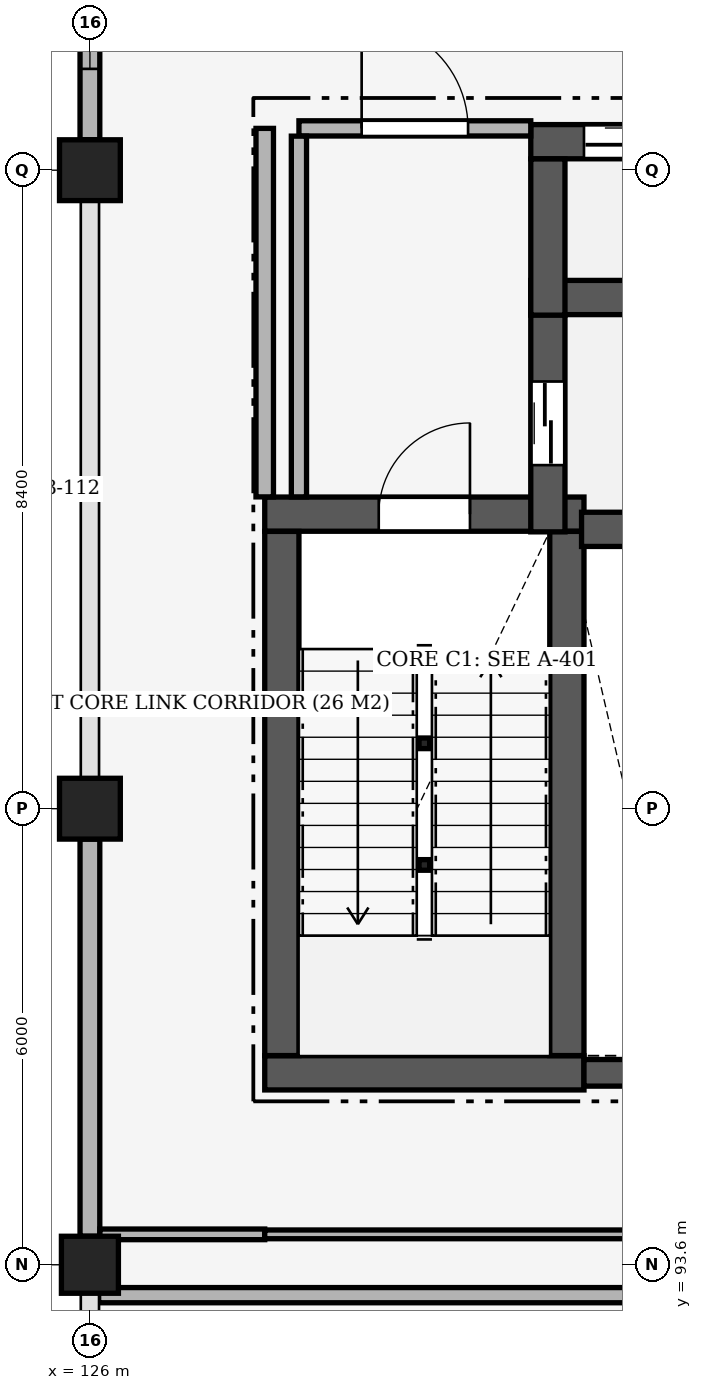
"""IFC4 building model, lengths in metres.
Left out: names, types, materials, properties, quantities, classifications, styles, units other than length and angle.
Written with IfcOpenShell. Run it as: python <this file> out.ifc"""

import sys

from ifc_helpers import new_model, si_unit, direction, frame, frame_2d, origin, origin_2d, place, context, subcontext, project, spatial, rectangle, hollow_circle, extrude, element, fill, save


model = new_model("IFC4")
c1 = context("Model", 3, precision=1e-05, world=origin(), true_north=direction((0.0, 1.0)))
c2 = subcontext(c1, "Body", "Model", "MODEL_VIEW")
j1 = project(units=[si_unit("LENGTHUNIT", "METRE"), si_unit("PLANEANGLEUNIT", "RADIAN")], contexts=[c1])
p1 = place(None, origin())
s1 = spatial("IfcSite", under=j1, at=p1, CompositionType="ELEMENT")
p2 = place(p1, origin())
s2 = spatial("IfcBuilding", under=s1, at=p2, CompositionType="ELEMENT")
p3 = place(p2, frame((0.0, 0.0, 15.3)))
s3 = spatial("IfcBuildingStorey", under=s2, at=p3, CompositionType="ELEMENT", Elevation=15.3)
p4 = place(p3, frame((126.0, 93.6, 0.0), z_axis=(0.0, 0.0, 1.0), x_axis=(1.0, 0.0, 0.0)))
e1 = element("IfcColumn", 1, at=p4, inside=s3, PredefinedType="COLUMN", context=c2, shape_type="SweptSolid", body=[
    extrude(rectangle(XDim=0.75, YDim=0.75, at=origin_2d()), origin(), (0.0, 0.0, 1.0), 5.1),
])
for number, where, z_axis, x_axis in (
    (2, (126.0, 99.6, 0.0), (0.0, 0.0, 1.0), (1.0, 0.0, 0.0)),
    (3, (126.0, 108.0, 0.0), (0.0, 0.0, 1.0), (1.0, 0.0, 0.0)),
):
    element("IfcColumn", number, at=place(p3, frame(where, z_axis=z_axis, x_axis=x_axis)), inside=s3, PredefinedType="COLUMN", context=c2, shape_type="SweptSolid", body=[
        extrude(rectangle(XDim=0.8, YDim=0.8, at=origin_2d()), origin(), (0.0, 0.0, 1.0), 5.1),
    ])
for number, where, z_axis, x_axis in (
    (4, (130.4, 98.86, -2.98), (0.0, 0.0, 1.0), (1.0, 0.0, 0.0)),
    (5, (130.4, 100.46, -2.98), (0.0, 0.0, 1.0), (1.0, 0.0, 0.0)),
):
    element("IfcColumn", number, at=place(p3, frame(where, z_axis=z_axis, x_axis=x_axis)), inside=s3, PredefinedType="COLUMN", context=c2, shape_type="SweptSolid", body=[
        extrude(hollow_circle(Radius=0.07, WallThickness=0.008, at=origin_2d()), origin(), (0.0, 0.0, 1.0), 5.1),
    ])
p5 = place(p3, frame((126.0, 93.975, 0.0), z_axis=(0.0, 0.0, 1.0), x_axis=(0.0, 1.0, 0.0)))
e6 = element("IfcWall", 6, at=p5, inside=s3, PredefinedType="SOLIDWALL", context=c2, shape_type="SweptSolid", body=[
    extrude(rectangle(XDim=5.225, YDim=0.26, at=frame_2d((2.612, 0.0))), origin(), (0.0, 0.0, 1.0), 4.29),
])
p6 = place(p3, frame((126.0, 108.4, 0.0), z_axis=(0.0, 0.0, 1.0), x_axis=(0.0, 1.0, 0.0)))
e7 = element("IfcWall", 7, at=p6, inside=s3, PredefinedType="SOLIDWALL", context=c2, shape_type="SweptSolid", body=[
    extrude(rectangle(XDim=4.6, YDim=0.26, at=frame_2d((2.3, 0.0))), origin(), (0.0, 0.0, 1.0), 4.29),
])
p7 = place(p6, frame((0.933, 0.0, 0.9)))
e8 = element("IfcOpeningElement", 8, at=p7, cuts=e7, PredefinedType="OPENING", context=c2, shape_type="SweptSolid", body=[
    extrude(rectangle(XDim=0.9, YDim=2.2, at=frame_2d((0.45, 1.1))), frame((0.0, 0.145, 0.0), z_axis=(0.0, -1.0, 0.0), x_axis=(1.0, 0.0, 0.0)), (0.0, 0.0, 1.0), 0.29),
])
p8 = place(p6, frame((2.767, 0.0, 0.9)))
e9 = element("IfcOpeningElement", 9, at=p8, cuts=e7, PredefinedType="OPENING", context=c2, shape_type="SweptSolid", body=[
    extrude(rectangle(XDim=0.9, YDim=2.2, at=frame_2d((0.45, 1.1))), frame((0.0, 0.145, 0.0), z_axis=(0.0, -1.0, 0.0), x_axis=(1.0, 0.0, 0.0)), (0.0, 0.0, 1.0), 0.29),
])
p9 = place(p3, frame((128.3, 103.475, 0.0), z_axis=(0.0, 0.0, 1.0), x_axis=(1.0, 0.0, 0.0)))
e10 = element("IfcWall", 10, at=p9, inside=s3, PredefinedType="SHEAR", context=c2, shape_type="SweptSolid", body=[
    extrude(rectangle(XDim=4.2, YDim=0.45, at=frame_2d((2.1, 0.0))), origin(), (0.0, 0.0, 1.0), 4.84),
])
p10 = place(p9, frame((1.5, 0.0, 0.0)))
e11 = element("IfcOpeningElement", 11, at=p10, cuts=e10, PredefinedType="OPENING", context=c2, shape_type="SweptSolid", body=[
    extrude(rectangle(XDim=1.2, YDim=2.2, at=frame_2d((0.6, 1.1))), frame((0.0, 0.24, 0.0), z_axis=(0.0, -1.0, 0.0), x_axis=(1.0, 0.0, 0.0)), (0.0, 0.0, 1.0), 0.48),
])
p11 = place(p3, frame((128.3, 96.125, 0.0), z_axis=(0.0, 0.0, 1.0), x_axis=(1.0, 0.0, 0.0)))
e12 = element("IfcWall", 12, at=p11, inside=s3, PredefinedType="SHEAR", context=c2, shape_type="SweptSolid", body=[
    extrude(rectangle(XDim=4.2, YDim=0.45, at=frame_2d((2.1, 0.0))), origin(), (0.0, 0.0, 1.0), 4.84),
])
for number, where, z_axis, x_axis in (
    (13, (128.525, 96.352, 0.0), (0.0, 0.0, 1.0), (0.0, 1.0, 0.0)),
    (14, (132.275, 96.352, 0.0), (0.0, 0.0, 1.0), (0.0, 1.0, 0.0)),
):
    element("IfcWall", number, at=place(p3, frame(where, z_axis=z_axis, x_axis=x_axis)), inside=s3, PredefinedType="SHEAR", context=c2, shape_type="SweptSolid", body=[
        extrude(rectangle(XDim=6.896, YDim=0.45, at=frame_2d((3.448, 0.0))), origin(), (0.0, 0.0, 1.0), 4.84),
    ])
p12 = place(p3, frame((132.468, 103.275, 0.0), z_axis=(0.0, 0.0, 1.0), x_axis=(1.0, 0.0, 0.0)))
e15 = element("IfcWall", 15, at=p12, inside=s3, PredefinedType="SHEAR", context=c2, shape_type="SweptSolid", body=[
    extrude(rectangle(XDim=1.832, YDim=0.45, at=frame_2d((0.916, 0.0))), origin(), (0.0, 0.0, 1.0), 4.84),
])
p13 = place(p3, frame((131.8, 106.325, 0.0), z_axis=(0.0, 0.0, 1.0), x_axis=(1.0, 0.0, 0.0)))
e16 = element("IfcWall", 16, at=p13, inside=s3, PredefinedType="SHEAR", context=c2, shape_type="SweptSolid", body=[
    extrude(rectangle(XDim=2.5, YDim=0.45, at=frame_2d((1.25, 0.0))), origin(), (0.0, 0.0, 1.0), 4.84),
])
p14 = place(p3, frame((132.025, 103.242, 0.0), z_axis=(0.0, 0.0, 1.0), x_axis=(0.0, 1.0, 0.0)))
e17 = element("IfcWall", 17, at=p14, inside=s3, PredefinedType="SHEAR", context=c2, shape_type="SweptSolid", body=[
    extrude(rectangle(XDim=2.856, YDim=0.45, at=frame_2d((1.428, 0.0))), origin(), (0.0, 0.0, 1.0), 4.84),
])
p15 = place(p14, frame((0.878, 0.0, 0.0)))
e18 = element("IfcOpeningElement", 18, at=p15, cuts=e17, PredefinedType="OPENING", context=c2, shape_type="SweptSolid", body=[
    extrude(rectangle(XDim=1.1, YDim=2.15, at=frame_2d((0.55, 1.075))), frame((0.0, 0.24, 0.0), z_axis=(0.0, -1.0, 0.0), x_axis=(1.0, 0.0, 0.0)), (0.0, 0.0, 1.0), 0.48),
])
p16 = place(p3, frame((131.8, 108.375, 0.0), z_axis=(0.0, 0.0, 1.0), x_axis=(1.0, 0.0, 0.0)))
e19 = element("IfcWall", 19, at=p16, inside=s3, PredefinedType="SHEAR", context=c2, shape_type="SweptSolid", body=[
    extrude(rectangle(XDim=2.5, YDim=0.45, at=frame_2d((1.25, 0.0))), origin(), (0.0, 0.0, 1.0), 4.84),
])
p17 = place(p16, frame((0.7, 0.0, 0.0)))
e20 = element("IfcOpeningElement", 20, at=p17, cuts=e19, PredefinedType="OPENING", context=c2, shape_type="SweptSolid", body=[
    extrude(rectangle(XDim=1.1, YDim=2.15, at=frame_2d((0.55, 1.075))), frame((0.0, 0.24, 0.0), z_axis=(0.0, -1.0, 0.0), x_axis=(1.0, 0.0, 0.0)), (0.0, 0.0, 1.0), 0.48),
])
p18 = place(p3, frame((132.025, 106.093, 0.0), z_axis=(0.0, 0.0, 1.0), x_axis=(0.0, 1.0, 0.0)))
e21 = element("IfcWall", 21, at=p18, inside=s3, PredefinedType="SHEAR", context=c2, shape_type="SweptSolid", body=[
    extrude(rectangle(XDim=2.055, YDim=0.45, at=frame_2d((1.027, 0.0))), origin(), (0.0, 0.0, 1.0), 4.84),
])
p19 = place(p3, frame((132.5, 96.125, 0.0), z_axis=(0.0, 0.0, 1.0), x_axis=(1.0, 0.0, 0.0)))
e22 = element("IfcWall", 22, at=p19, inside=s3, PredefinedType="SHEAR", context=c2, shape_type="SweptSolid", body=[
    extrude(rectangle(XDim=1.8, YDim=0.35, at=frame_2d((0.9, 0.0))), origin(), (0.0, 0.0, 1.0), 4.84),
])
p20 = place(p3, frame((126.115, 93.2, 0.0), z_axis=(0.0, 0.0, 1.0), x_axis=(1.0, 0.0, 0.0)))
e23 = element("IfcWall", 23, at=p20, inside=s3, PredefinedType="PARTITIONING", context=c2, shape_type="SweptSolid", body=[
    extrude(rectangle(XDim=12.685, YDim=0.2, at=frame_2d((6.343, 0.0))), origin(), (0.0, 0.0, 1.0), 4.14),
])
p21 = place(p3, frame((126.132, 94.0, 0.0), z_axis=(0.0, 0.0, 1.0), x_axis=(1.0, 0.0, 0.0)))
e24 = element("IfcWall", 24, at=p21, inside=s3, PredefinedType="PARTITIONING", context=c2, shape_type="SweptSolid", body=[
    extrude(rectangle(XDim=2.168, YDim=0.14, at=frame_2d((1.084, 0.0))), origin(), (0.0, 0.0, 1.0), 4.29),
])
p22 = place(p3, frame((128.3, 94.0, 0.0), z_axis=(0.0, 0.0, 1.0), x_axis=(1.0, 0.0, 0.0)))
e25 = element("IfcWall", 25, at=p22, inside=s3, PredefinedType="PARTITIONING", context=c2, shape_type="SweptSolid", body=[
    extrude(rectangle(XDim=10.5, YDim=0.115, at=frame_2d((5.25, 0.0))), origin(), (0.0, 0.0, 1.0), 4.29),
])
p23 = place(p3, frame((128.75, 108.55, 0.0), z_axis=(0.0, 0.0, 1.0), x_axis=(1.0, 0.0, 0.0)))
e26 = element("IfcWall", 26, at=p23, inside=s3, PredefinedType="PARTITIONING", context=c2, shape_type="SweptSolid", body=[
    extrude(rectangle(XDim=3.05, YDim=0.2, at=frame_2d((1.525, 0.0))), origin(), (0.0, 0.0, 1.0), 4.84),
])
p24 = place(p23, frame((0.825, 0.0, 0.0)))
e27 = element("IfcOpeningElement", 27, at=p24, cuts=e26, PredefinedType="OPENING", context=c2, shape_type="SweptSolid", body=[
    extrude(rectangle(XDim=1.4, YDim=2.2, at=frame_2d((0.7, 1.1))), frame((0.0, 0.115, 0.0), z_axis=(0.0, -1.0, 0.0), x_axis=(1.0, 0.0, 0.0)), (0.0, 0.0, 1.0), 0.23),
])
p25 = place(p3, frame((128.3, 103.702, 0.0), z_axis=(0.0, 0.0, 1.0), x_axis=(0.0, 1.0, 0.0)))
e28 = element("IfcWall", 28, at=p25, inside=s3, PredefinedType="SOLIDWALL", context=c2, shape_type="SweptSolid", body=[
    extrude(rectangle(XDim=4.848, YDim=0.23, at=frame_2d((2.424, 0.0))), origin(), (0.0, 0.0, 1.0), 4.84),
])
p26 = place(p3, frame((128.75, 103.702, 0.0), z_axis=(0.0, 0.0, 1.0), x_axis=(0.0, 1.0, 0.0)))
e29 = element("IfcWall", 29, at=p26, inside=s3, PredefinedType="PARTITIONING", context=c2, shape_type="SweptSolid", body=[
    extrude(rectangle(XDim=4.746, YDim=0.2, at=frame_2d((2.373, 0.0))), origin(), (0.0, 0.0, 1.0), 4.84),
])
p27 = place(p7, origin())
e30 = element("IfcWindow", 30, at=p27, inside=s3, PartitioningType="SINGLE_PANEL", PredefinedType="WINDOW", context=c2, shape_type="SweptSolid", body=[
    extrude(rectangle(XDim=0.9, YDim=2.2, at=frame_2d((0.45, 1.1))), frame((0.0, 0.03, 0.0), z_axis=(0.0, -1.0, 0.0), x_axis=(1.0, 0.0, 0.0)), (0.0, 0.0, 1.0), 0.06),
])
fill(e8, e30)
p28 = place(p10, origin())
e31 = element("IfcDoor", 31, at=p28, inside=s3, OperationType="SINGLE_SWING_RIGHT", PredefinedType="DOOR", context=c2, shape_type="SweptSolid", body=[
    extrude(rectangle(XDim=1.2, YDim=2.2, at=frame_2d((0.6, 1.1))), frame((0.0, 0.025, 0.0), z_axis=(0.0, -1.0, 0.0), x_axis=(1.0, 0.0, 0.0)), (0.0, 0.0, 1.0), 0.05),
])
fill(e11, e31)
p29 = place(p15, origin())
e32 = element("IfcDoor", 32, at=p29, inside=s3, OperationType="DOUBLE_DOOR_SLIDING", PredefinedType="DOOR", context=c2, shape_type="SweptSolid", body=[
    extrude(rectangle(XDim=1.1, YDim=2.15, at=frame_2d((0.55, 1.075))), frame((0.0, 0.025, 0.0), z_axis=(0.0, -1.0, 0.0), x_axis=(1.0, 0.0, 0.0)), (0.0, 0.0, 1.0), 0.05),
])
fill(e18, e32)
p30 = place(p17, origin())
e33 = element("IfcDoor", 33, at=p30, inside=s3, OperationType="DOUBLE_DOOR_SLIDING", PredefinedType="DOOR", context=c2, shape_type="SweptSolid", body=[
    extrude(rectangle(XDim=1.1, YDim=2.15, at=frame_2d((0.55, 1.075))), frame((0.0, 0.025, 0.0), z_axis=(0.0, -1.0, 0.0), x_axis=(1.0, 0.0, 0.0)), (0.0, 0.0, 1.0), 0.05),
])
fill(e20, e33)
p31 = place(p24, origin())
e34 = element("IfcDoor", 34, at=p31, inside=s3, OperationType="SINGLE_SWING_LEFT", PredefinedType="DOOR", context=c2, shape_type="SweptSolid", body=[
    extrude(rectangle(XDim=1.4, YDim=2.2, at=frame_2d((0.7, 1.1))), frame((0.0, 0.025, 0.0), z_axis=(0.0, -1.0, 0.0), x_axis=(1.0, 0.0, 0.0)), (0.0, 0.0, 1.0), 0.05),
])
fill(e27, e34)
save(model, sys.argv[1])
